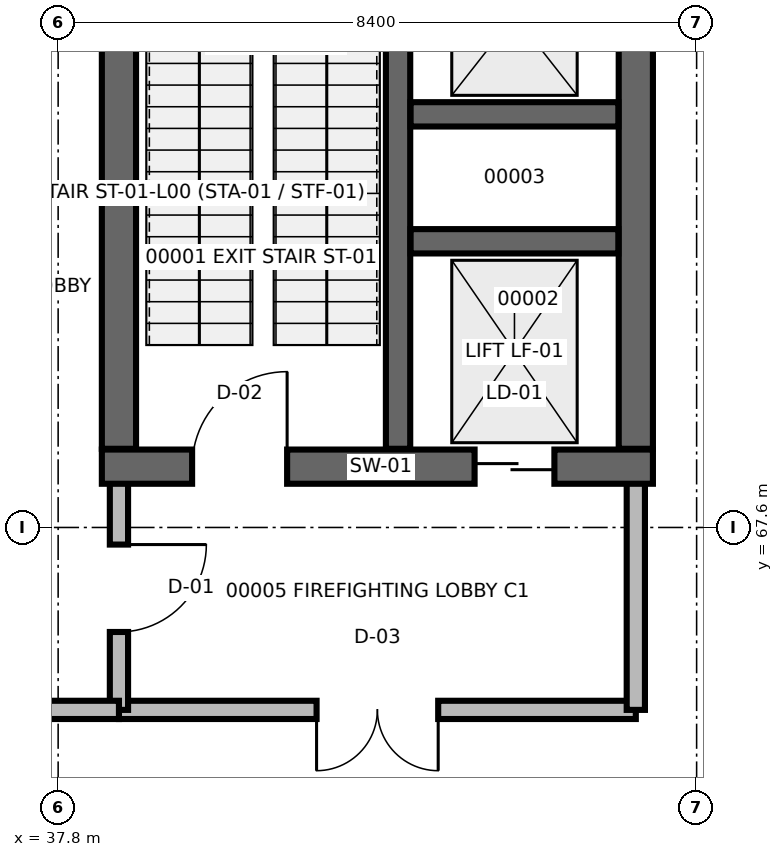
"""IFC4 building model, lengths in metres.
Left out: names, types, materials, properties, quantities, classifications, styles, units other than length and angle.
Written with IfcOpenShell. Run it as: python <this file> out.ifc"""

import sys

from ifc_helpers import new_model, si_unit, direction, frame, frame_2d, origin, place, context, subcontext, project, spatial, rectangle, extrude, element, fill, save


model = new_model("IFC4")
c1 = context("Model", 3, precision=1e-05, world=origin(), true_north=direction((0.0, 1.0)))
c2 = subcontext(c1, "Body", "Model", "MODEL_VIEW")
j1 = project(units=[si_unit("LENGTHUNIT", "METRE"), si_unit("PLANEANGLEUNIT", "RADIAN")], contexts=[c1])
p1 = place(None, origin())
s1 = spatial("IfcSite", under=j1, at=p1, CompositionType="ELEMENT")
p2 = place(p1, origin())
s2 = spatial("IfcBuilding", under=s1, at=p2, CompositionType="ELEMENT")
p3 = place(p2, origin())
s3 = spatial("IfcBuildingStorey", under=s2, at=p3, CompositionType="ELEMENT", Elevation=0.0)
p4 = place(p3, frame((38.6, 65.2, 0.0), z_axis=(0.0, 0.0, 1.0), x_axis=(1.0, 0.0, 0.0)))
e1 = element("IfcWall", 1, at=p4, inside=s3, PredefinedType="SOLIDWALL", context=c2, shape_type="SweptSolid", body=[
    extrude(rectangle(XDim=6.8, YDim=0.24, at=frame_2d((3.4, 0.0))), origin(), (0.0, 0.0, 1.0), 4.72),
])
p5 = place(p4, frame((2.6, 0.0, 0.0)))
e2 = element("IfcOpeningElement", 2, at=p5, cuts=e1, PredefinedType="OPENING", context=c2, shape_type="SweptSolid", body=[
    extrude(rectangle(XDim=1.6, YDim=2.2, at=frame_2d((0.8, 1.1))), frame((0.0, 0.13, 0.0), z_axis=(0.0, -1.0, 0.0), x_axis=(1.0, 0.0, 0.0)), (0.0, 0.0, 1.0), 0.26),
])
p6 = place(p3, frame((38.6, 68.4, 0.0), z_axis=(0.0, 0.0, 1.0), x_axis=(0.0, -1.0, 0.0)))
e3 = element("IfcWall", 3, at=p6, inside=s3, PredefinedType="SOLIDWALL", context=c2, shape_type="SweptSolid", body=[
    extrude(rectangle(XDim=3.2, YDim=0.24, at=frame_2d((1.6, 0.0))), origin(), (0.0, 0.0, 1.0), 4.72),
])
p7 = place(p6, frame((1.025, 0.0, 0.0)))
e4 = element("IfcOpeningElement", 4, at=p7, cuts=e3, PredefinedType="OPENING", context=c2, shape_type="SweptSolid", body=[
    extrude(rectangle(XDim=1.15, YDim=2.15, at=frame_2d((0.575, 1.075))), frame((0.0, 0.13, 0.0), z_axis=(0.0, -1.0, 0.0), x_axis=(1.0, 0.0, 0.0)), (0.0, 0.0, 1.0), 0.26),
])
p8 = place(p3, frame((45.4, 65.2, 0.0), z_axis=(0.0, 0.0, 1.0), x_axis=(0.0, 1.0, 0.0)))
e5 = element("IfcWall", 5, at=p8, inside=s3, PredefinedType="SOLIDWALL", context=c2, shape_type="SweptSolid", body=[
    extrude(rectangle(XDim=3.2, YDim=0.24, at=frame_2d((1.6, 0.0))), origin(), (0.0, 0.0, 1.0), 4.72),
])
p9 = place(p3, frame((38.375, 68.4, 0.0), z_axis=(0.0, 0.0, 1.0), x_axis=(1.0, 0.0, 0.0)))
e6 = element("IfcWall", 6, at=p9, inside=s3, PredefinedType="SHEAR", context=c2, shape_type="SweptSolid", body=[
    extrude(rectangle(XDim=7.25, YDim=0.45, at=frame_2d((3.625, 0.0))), origin(), (0.0, 0.0, 1.0), 4.82),
])
p10 = place(p9, frame((1.188, 0.0, 0.0)))
e7 = element("IfcOpeningElement", 7, at=p10, cuts=e6, PredefinedType="OPENING", context=c2, shape_type="SweptSolid", body=[
    extrude(rectangle(XDim=1.25, YDim=2.2, at=frame_2d((0.625, 1.1))), frame((0.0, 0.235, 0.0), z_axis=(0.0, -1.0, 0.0), x_axis=(1.0, 0.0, 0.0)), (0.0, 0.0, 1.0), 0.47),
])
p11 = place(p9, frame((4.904, 0.0, 0.0)))
e8 = element("IfcOpeningElement", 8, at=p11, cuts=e6, PredefinedType="OPENING", context=c2, shape_type="SweptSolid", body=[
    extrude(rectangle(XDim=1.05, YDim=2.15, at=frame_2d((0.525, 1.075))), frame((0.0, 0.235, 0.0), z_axis=(0.0, -1.0, 0.0), x_axis=(1.0, 0.0, 0.0)), (0.0, 0.0, 1.0), 0.47),
])
for number, where, z_axis, x_axis in (
    (9, (38.6, 68.635, 0.0), (0.0, 0.0, 1.0), (0.0, 1.0, 0.0)),
    (10, (45.4, 68.635, 0.0), (0.0, 0.0, 1.0), (0.0, 1.0, 0.0)),
):
    element("IfcWall", number, at=place(p3, frame(where, z_axis=z_axis, x_axis=x_axis)), inside=s3, PredefinedType="SHEAR", context=c2, shape_type="SweptSolid", body=[
        extrude(rectangle(XDim=6.83, YDim=0.45, at=frame_2d((3.415, 0.0))), origin(), (0.0, 0.0, 1.0), 4.82),
    ])
p12 = place(p3, frame((42.272, 68.635, 0.0), z_axis=(0.0, 0.0, 1.0), x_axis=(0.0, 1.0, 0.0)))
e11 = element("IfcWall", 11, at=p12, inside=s3, PredefinedType="SHEAR", context=c2, shape_type="SweptSolid", body=[
    extrude(rectangle(XDim=6.83, YDim=0.32, at=frame_2d((3.415, 0.0))), origin(), (0.0, 0.0, 1.0), 4.82),
])
for number, where, z_axis, x_axis in (
    (12, (42.437, 71.365, 0.0), (0.0, 0.0, 1.0), (1.0, 0.0, 0.0)),
    (13, (42.437, 73.035, 0.0), (0.0, 0.0, 1.0), (1.0, 0.0, 0.0)),
):
    element("IfcWall", number, at=place(p3, frame(where, z_axis=z_axis, x_axis=x_axis)), inside=s3, PredefinedType="SHEAR", context=c2, shape_type="SweptSolid", body=[
        extrude(rectangle(XDim=2.733, YDim=0.32, at=frame_2d((1.366, 0.0))), origin(), (0.0, 0.0, 1.0), 4.82),
    ])
p13 = place(p3, frame((37.0, 65.2, 0.0), z_axis=(0.0, 0.0, 1.0), x_axis=(1.0, 0.0, 0.0)))
e14 = element("IfcWall", 14, at=p13, inside=s3, PredefinedType="SOLIDWALL", context=c2, shape_type="SweptSolid", body=[
    extrude(rectangle(XDim=1.6, YDim=0.24, at=frame_2d((0.8, 0.0))), origin(), (0.0, 0.0, 1.0), 4.72),
])
p14 = place(p5, frame((1.6, 0.0, 0.0), z_axis=(0.0, 0.0, 1.0), x_axis=(-1.0, 0.0, 0.0)))
e15 = element("IfcDoor", 15, at=p14, inside=s3, OperationType="DOUBLE_DOOR_SINGLE_SWING", PredefinedType="DOOR", context=c2, shape_type="SweptSolid", body=[
    extrude(rectangle(XDim=1.6, YDim=2.2, at=frame_2d((0.8, 1.1))), frame((0.0, 0.025, 0.0), z_axis=(0.0, -1.0, 0.0), x_axis=(1.0, 0.0, 0.0)), (0.0, 0.0, 1.0), 0.05),
])
fill(e2, e15)
p15 = place(p7, frame((1.15, 0.0, 0.0), z_axis=(0.0, 0.0, 1.0), x_axis=(-1.0, 0.0, 0.0)))
e16 = element("IfcDoor", 16, at=p15, inside=s3, OperationType="SINGLE_SWING_RIGHT", PredefinedType="DOOR", context=c2, shape_type="SweptSolid", body=[
    extrude(rectangle(XDim=1.15, YDim=2.15, at=frame_2d((0.575, 1.075))), frame((0.0, 0.025, 0.0), z_axis=(0.0, -1.0, 0.0), x_axis=(1.0, 0.0, 0.0)), (0.0, 0.0, 1.0), 0.05),
])
fill(e4, e16)
p16 = place(p10, frame((1.25, 0.0, 0.0), z_axis=(0.0, 0.0, 1.0), x_axis=(-1.0, 0.0, 0.0)))
e17 = element("IfcDoor", 17, at=p16, inside=s3, OperationType="SINGLE_SWING_LEFT", PredefinedType="DOOR", context=c2, shape_type="SweptSolid", body=[
    extrude(rectangle(XDim=1.25, YDim=2.2, at=frame_2d((0.625, 1.1))), frame((0.0, 0.025, 0.0), z_axis=(0.0, -1.0, 0.0), x_axis=(1.0, 0.0, 0.0)), (0.0, 0.0, 1.0), 0.05),
])
fill(e7, e17)
p17 = place(p11, frame((1.05, 0.0, 0.0), z_axis=(0.0, 0.0, 1.0), x_axis=(-1.0, 0.0, 0.0)))
e18 = element("IfcDoor", 18, at=p17, inside=s3, OperationType="DOUBLE_DOOR_SLIDING", PredefinedType="DOOR", context=c2, shape_type="SweptSolid", body=[
    extrude(rectangle(XDim=1.05, YDim=2.15, at=frame_2d((0.525, 1.075))), frame((0.0, 0.025, 0.0), z_axis=(0.0, -1.0, 0.0), x_axis=(1.0, 0.0, 0.0)), (0.0, 0.0, 1.0), 0.05),
])
fill(e8, e18)
save(model, sys.argv[1])
